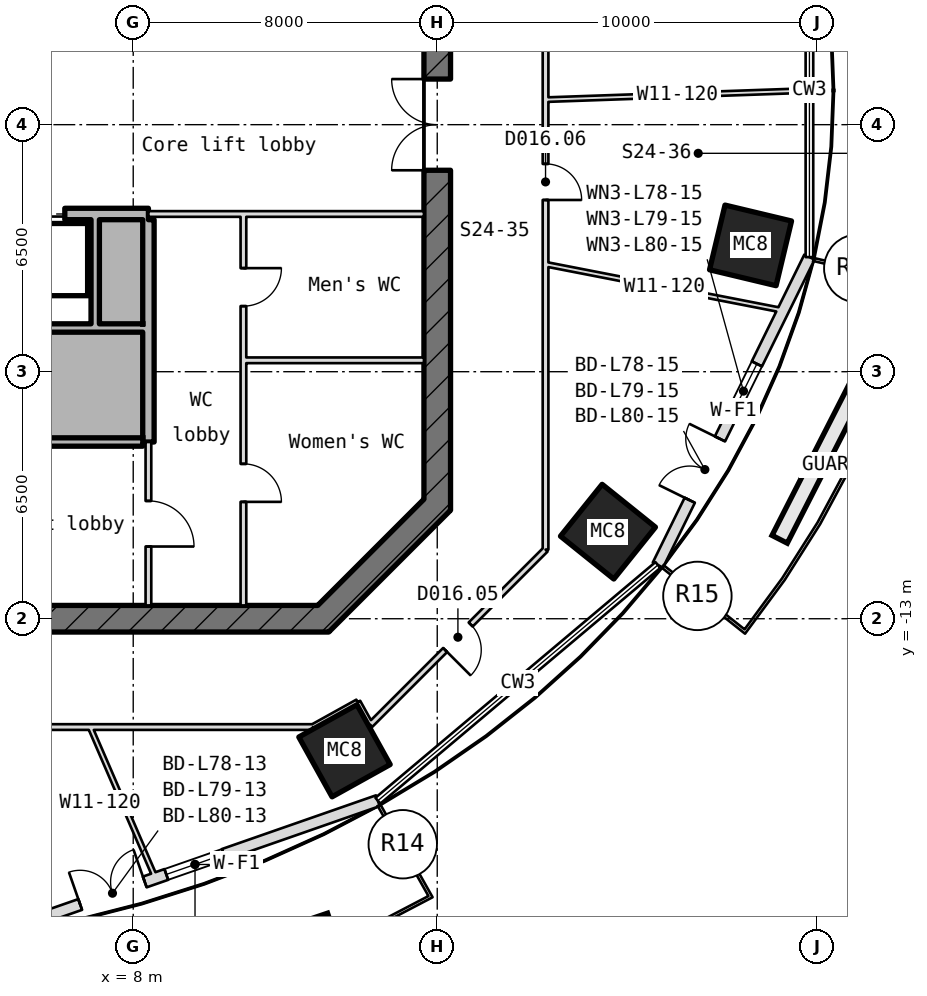
"""IFC4 building model, lengths in metres.
Left out: names, types, materials, properties, quantities, classifications, styles, units other than length and angle.
Written with IfcOpenShell. Run it as: python <this file> out.ifc"""

import sys

from ifc_helpers import new_model, si_unit, direction, frame, frame_2d, origin, origin_2d, place, context, subcontext, project, spatial, rectangle, hollow_rectangle, extrude, element, fill, save


model = new_model("IFC4")
c1 = context("Model", 3, precision=1e-05, world=origin(), true_north=direction((0.0, 1.0)))
c2 = subcontext(c1, "Body", "Model", "MODEL_VIEW")
j1 = project(units=[si_unit("LENGTHUNIT", "METRE"), si_unit("PLANEANGLEUNIT", "RADIAN")], contexts=[c1])
p1 = place(None, origin())
s1 = spatial("IfcSite", under=j1, at=p1, CompositionType="ELEMENT")
p2 = place(p1, origin())
s2 = spatial("IfcBuilding", under=s1, at=p2, CompositionType="ELEMENT")
p3 = place(p2, frame((0.0, 0.0, 346.75)))
s3 = spatial("IfcBuildingStorey", under=s2, at=p3, CompositionType="ELEMENT", Elevation=346.75)
for number, where, z_axis, x_axis in (
    (1, (13.56, -16.474, -0.18), (0.0, 0.0, 1.0), (-0.874, -0.486, 0.0)),
    (2, (20.492, -10.709, -0.18), (0.0, 0.0, 1.0), (-0.626, -0.78, 0.0)),
    (3, (24.244, -3.177, -0.18), (0.0, 0.0, 1.0), (-0.233, -0.973, 0.0)),
):
    element("IfcColumn", number, at=place(p3, frame(where, z_axis=z_axis, x_axis=x_axis)), inside=s3, PredefinedType="COLUMN", context=c2, shape_type="SweptSolid", body=[
        extrude(hollow_rectangle(XDim=1.75, YDim=1.8, WallThickness=0.055, at=origin_2d()), origin(), (0.0, 0.0, 1.0), 4.15),
    ])
p4 = place(p3, frame((4.81, -21.144, 0.0), z_axis=(0.0, 0.0, 1.0), x_axis=(0.944274972987, 0.329157675576, 0.0)))
e4 = element("IfcWall", 4, at=p4, inside=s3, PredefinedType="SOLIDWALL", context=c2, shape_type="SweptSolid", body=[
    extrude(rectangle(XDim=10.196, YDim=0.3, at=frame_2d((5.098, 0.0))), origin(), (0.0, 0.0, 1.0), 3.97),
])
p5 = place(p4, frame((1.9, 0.0, 0.0)))
e5 = element("IfcOpeningElement", 5, at=p5, cuts=e4, PredefinedType="OPENING", context=c2, shape_type="SweptSolid", body=[
    extrude(rectangle(XDim=1.8, YDim=2.4, at=frame_2d((0.9, 1.2))), frame((0.0, 0.16, 0.0), z_axis=(0.0, -1.0, 0.0), x_axis=(1.0, 0.0, 0.0)), (0.0, 0.0, 1.0), 0.32),
])
p6 = place(p4, frame((4.3, 0.0, 0.9)))
e6 = element("IfcOpeningElement", 6, at=p6, cuts=e4, PredefinedType="OPENING", context=c2, shape_type="SweptSolid", body=[
    extrude(rectangle(XDim=1.6, YDim=1.5, at=frame_2d((0.8, 0.75))), frame((0.0, 0.16, 0.0), z_axis=(0.0, -1.0, 0.0), x_axis=(1.0, 0.0, 0.0)), (0.0, 0.0, 1.0), 0.32),
])
p7 = place(p3, frame((21.806, -11.587, 0.0), z_axis=(0.0, 0.0, 1.0), x_axis=(0.441581239579, 0.897221270842, 0.0)))
e7 = element("IfcWall", 7, at=p7, inside=s3, PredefinedType="SOLIDWALL", context=c2, shape_type="SweptSolid", body=[
    extrude(rectangle(XDim=9.03, YDim=0.3, at=frame_2d((4.515, 0.0))), origin(), (0.0, 0.0, 1.0), 3.97),
])
p8 = place(p7, frame((1.9, 0.0, 0.0)))
e8 = element("IfcOpeningElement", 8, at=p8, cuts=e7, PredefinedType="OPENING", context=c2, shape_type="SweptSolid", body=[
    extrude(rectangle(XDim=1.8, YDim=2.4, at=frame_2d((0.9, 1.2))), frame((0.0, 0.16, 0.0), z_axis=(0.0, -1.0, 0.0), x_axis=(1.0, 0.0, 0.0)), (0.0, 0.0, 1.0), 0.32),
])
p9 = place(p7, frame((4.3, 0.0, 0.9)))
e9 = element("IfcOpeningElement", 9, at=p9, cuts=e7, PredefinedType="OPENING", context=c2, shape_type="SweptSolid", body=[
    extrude(rectangle(XDim=1.6, YDim=1.5, at=frame_2d((0.8, 0.75))), frame((0.0, 0.16, 0.0), z_axis=(0.0, -1.0, 0.0), x_axis=(1.0, 0.0, 0.0)), (0.0, 0.0, 1.0), 0.32),
])
p10 = place(p3, frame((12.897, -13.103, -0.18), z_axis=(0.0, 0.0, 1.0), x_axis=(0.707106781187, 0.707106781187, 0.0)))
e10 = element("IfcWall", 10, at=p10, inside=s3, PredefinedType="SHEAR", context=c2, shape_type="SweptSolid", body=[
    extrude(rectangle(XDim=4.533, YDim=0.7, at=frame_2d((2.266, 0.0))), origin(), (0.0, 0.0, 1.0), 4.15),
])
p11 = place(p3, frame((16.0, -10.145, -0.18), z_axis=(0.0, 0.0, 1.0), x_axis=(0.0, 1.0, 0.0)))
e11 = element("IfcWall", 11, at=p11, inside=s3, PredefinedType="SHEAR", context=c2, shape_type="SweptSolid", body=[
    extrude(rectangle(XDim=20.29, YDim=0.7, at=frame_2d((10.145, 0.0))), origin(), (0.0, 0.0, 1.0), 4.15),
])
p12 = place(p11, frame((8.945, 0.0, 0.18)))
e12 = element("IfcOpeningElement", 12, at=p12, cuts=e11, PredefinedType="OPENING", context=c2, shape_type="SweptSolid", body=[
    extrude(rectangle(XDim=2.4, YDim=2.1, at=frame_2d((1.2, 1.05))), frame((0.0, 0.36, 0.0), z_axis=(0.0, -1.0, 0.0), x_axis=(1.0, 0.0, 0.0)), (0.0, 0.0, 1.0), 0.72),
])
p13 = place(p11, frame((13.545, 0.0, 0.18)))
e13 = element("IfcOpeningElement", 13, at=p13, cuts=e11, PredefinedType="OPENING", context=c2, shape_type="SweptSolid", body=[
    extrude(rectangle(XDim=1.2, YDim=2.1, at=frame_2d((0.6, 1.05))), frame((0.0, 0.36, 0.0), z_axis=(0.0, -1.0, 0.0), x_axis=(1.0, 0.0, 0.0)), (0.0, 0.0, 1.0), 0.72),
])
p14 = place(p3, frame((-13.145, -13.0, -0.18), z_axis=(0.0, 0.0, 1.0), x_axis=(1.0, 0.0, 0.0)))
e14 = element("IfcWall", 14, at=p14, inside=s3, PredefinedType="SHEAR", context=c2, shape_type="SweptSolid", body=[
    extrude(rectangle(XDim=26.29, YDim=0.7, at=frame_2d((13.145, 0.0))), origin(), (0.0, 0.0, 1.0), 4.15),
])
p15 = place(p14, frame((2.845, 0.0, 0.18)))
e15 = element("IfcOpeningElement", 15, at=p15, cuts=e14, PredefinedType="OPENING", context=c2, shape_type="SweptSolid", body=[
    extrude(rectangle(XDim=1.2, YDim=2.1, at=frame_2d((0.6, 1.05))), frame((0.0, 0.36, 0.0), z_axis=(0.0, -1.0, 0.0), x_axis=(1.0, 0.0, 0.0)), (0.0, 0.0, 1.0), 0.72),
])
p16 = place(p14, frame((6.845, 0.0, 0.18)))
e16 = element("IfcOpeningElement", 16, at=p16, cuts=e14, PredefinedType="OPENING", context=c2, shape_type="SweptSolid", body=[
    extrude(rectangle(XDim=1.4, YDim=2.1, at=frame_2d((0.7, 1.05))), frame((0.0, 0.36, 0.0), z_axis=(0.0, -1.0, 0.0), x_axis=(1.0, 0.0, 0.0)), (0.0, 0.0, 1.0), 0.72),
])
p17 = place(p14, frame((15.445, 0.0, 0.18)))
e17 = element("IfcOpeningElement", 17, at=p17, cuts=e14, PredefinedType="OPENING", context=c2, shape_type="SweptSolid", body=[
    extrude(rectangle(XDim=1.4, YDim=2.1, at=frame_2d((0.7, 1.05))), frame((0.0, 0.36, 0.0), z_axis=(0.0, -1.0, 0.0), x_axis=(1.0, 0.0, 0.0)), (0.0, 0.0, 1.0), 0.72),
])
p18 = place(p3, frame((-2.69, -8.35, 0.0), z_axis=(0.0, 0.0, 1.0), x_axis=(1.0, 0.0, 0.0)))
e18 = element("IfcWall", 18, at=p18, inside=s3, PredefinedType="STANDARD", context=c2, shape_type="SweptSolid", body=[
    extrude(rectangle(XDim=10.94, YDim=0.22, at=frame_2d((5.47, 0.0))), origin(), (0.0, 0.0, 1.0), 3.97),
])
p19 = place(p18, frame((0.74, 0.0, 0.0)))
e19 = element("IfcOpeningElement", 19, at=p19, cuts=e18, PredefinedType="OPENING", context=c2, shape_type="SweptSolid", body=[
    extrude(rectangle(XDim=1.1, YDim=2.1, at=frame_2d((0.55, 1.05))), frame((0.0, 0.12, 0.0), z_axis=(0.0, -1.0, 0.0), x_axis=(1.0, 0.0, 0.0)), (0.0, 0.0, 1.0), 0.24),
])
p20 = place(p18, frame((3.54, 0.0, 0.0)))
e20 = element("IfcOpeningElement", 20, at=p20, cuts=e18, PredefinedType="OPENING", context=c2, shape_type="SweptSolid", body=[
    extrude(rectangle(XDim=1.1, YDim=2.1, at=frame_2d((0.55, 1.05))), frame((0.0, 0.12, 0.0), z_axis=(0.0, -1.0, 0.0), x_axis=(1.0, 0.0, 0.0)), (0.0, 0.0, 1.0), 0.24),
])
p21 = place(p3, frame((10.975, -6.2, 0.0), z_axis=(0.0, 0.0, 1.0), x_axis=(1.0, 0.0, 0.0)))
e21 = element("IfcWall", 21, at=p21, inside=s3, PredefinedType="PARTITIONING", context=c2, shape_type="SweptSolid", body=[
    extrude(rectangle(XDim=4.675, YDim=0.15, at=frame_2d((2.337, 0.0))), origin(), (0.0, 0.0, 1.0), 3.97),
])
p22 = place(p3, frame((-8.25, -5.35, 0.0), z_axis=(0.0, 0.0, 1.0), x_axis=(1.0, 0.0, 0.0)))
e22 = element("IfcWall", 22, at=p22, inside=s3, PredefinedType="STANDARD", context=c2, shape_type="SweptSolid", body=[
    extrude(rectangle(XDim=16.5, YDim=0.22, at=frame_2d((8.25, 0.0))), origin(), (0.0, 0.0, 1.0), 3.97),
])
p23 = place(p3, frame((-8.4, -2.35, -0.18), z_axis=(0.0, 0.0, 1.0), x_axis=(1.0, 0.0, 0.0)))
e23 = element("IfcWall", 23, at=p23, inside=s3, PredefinedType="SHEAR", context=c2, shape_type="SweptSolid", body=[
    extrude(rectangle(XDim=16.8, YDim=0.3, at=frame_2d((8.4, 0.0))), origin(), (0.0, 0.0, 1.0), 4.15),
])
p24 = place(p23, frame((2.2, 0.0, 0.18)))
e24 = element("IfcOpeningElement", 24, at=p24, cuts=e23, PredefinedType="OPENING", context=c2, shape_type="SweptSolid", body=[
    extrude(rectangle(XDim=1.2, YDim=2.1, at=frame_2d((0.6, 1.05))), frame((0.0, 0.16, 0.0), z_axis=(0.0, -1.0, 0.0), x_axis=(1.0, 0.0, 0.0)), (0.0, 0.0, 1.0), 0.32),
])
p25 = place(p23, frame((5.0, 0.0, 0.18)))
e25 = element("IfcOpeningElement", 25, at=p25, cuts=e23, PredefinedType="OPENING", context=c2, shape_type="SweptSolid", body=[
    extrude(rectangle(XDim=1.2, YDim=2.1, at=frame_2d((0.6, 1.05))), frame((0.0, 0.16, 0.0), z_axis=(0.0, -1.0, 0.0), x_axis=(1.0, 0.0, 0.0)), (0.0, 0.0, 1.0), 0.32),
])
p26 = place(p23, frame((7.8, 0.0, 0.18)))
e26 = element("IfcOpeningElement", 26, at=p26, cuts=e23, PredefinedType="OPENING", context=c2, shape_type="SweptSolid", body=[
    extrude(rectangle(XDim=1.2, YDim=2.1, at=frame_2d((0.6, 1.05))), frame((0.0, 0.16, 0.0), z_axis=(0.0, -1.0, 0.0), x_axis=(1.0, 0.0, 0.0)), (0.0, 0.0, 1.0), 0.32),
])
p27 = place(p23, frame((10.6, 0.0, 0.18)))
e27 = element("IfcOpeningElement", 27, at=p27, cuts=e23, PredefinedType="OPENING", context=c2, shape_type="SweptSolid", body=[
    extrude(rectangle(XDim=1.2, YDim=2.1, at=frame_2d((0.6, 1.05))), frame((0.0, 0.16, 0.0), z_axis=(0.0, -1.0, 0.0), x_axis=(1.0, 0.0, 0.0)), (0.0, 0.0, 1.0), 0.32),
])
p28 = place(p23, frame((13.4, 0.0, 0.18)))
e28 = element("IfcOpeningElement", 28, at=p28, cuts=e23, PredefinedType="OPENING", context=c2, shape_type="SweptSolid", body=[
    extrude(rectangle(XDim=1.2, YDim=2.1, at=frame_2d((0.6, 1.05))), frame((0.0, 0.16, 0.0), z_axis=(0.0, -1.0, 0.0), x_axis=(1.0, 0.0, 0.0)), (0.0, 0.0, 1.0), 0.32),
])
p29 = place(p3, frame((8.4, -2.35, 0.0), z_axis=(0.0, 0.0, 1.0), x_axis=(1.0, 0.0, 0.0)))
e29 = element("IfcWall", 29, at=p29, inside=s3, PredefinedType="PARTITIONING", context=c2, shape_type="SweptSolid", body=[
    extrude(rectangle(XDim=7.25, YDim=0.15, at=frame_2d((3.625, 0.0))), origin(), (0.0, 0.0, 1.0), 3.97),
])
p30 = place(p3, frame((7.0, -5.24, 0.0), z_axis=(0.0, 0.0, 1.0), x_axis=(0.0, 1.0, 0.0)))
e30 = element("IfcWall", 30, at=p30, inside=s3, PredefinedType="STANDARD", context=c2, shape_type="SweptSolid", body=[
    extrude(rectangle(XDim=2.74, YDim=0.22, at=frame_2d((1.37, 0.0))), origin(), (0.0, 0.0, 1.0), 3.97),
])
p31 = place(p3, frame((8.4, -12.65, 0.0), z_axis=(0.0, 0.0, 1.0), x_axis=(0.0, 1.0, 0.0)))
e31 = element("IfcWall", 31, at=p31, inside=s3, PredefinedType="PARTITIONING", context=c2, shape_type="SweptSolid", body=[
    extrude(rectangle(XDim=4.3, YDim=0.15, at=frame_2d((2.15, 0.0))), origin(), (0.0, 0.0, 1.0), 3.97),
])
p32 = place(p31, frame((1.55, 0.0, 0.0)))
e32 = element("IfcOpeningElement", 32, at=p32, cuts=e31, PredefinedType="OPENING", context=c2, shape_type="SweptSolid", body=[
    extrude(rectangle(XDim=1.2, YDim=2.1, at=frame_2d((0.6, 1.05))), frame((0.0, 0.085, 0.0), z_axis=(0.0, -1.0, 0.0), x_axis=(1.0, 0.0, 0.0)), (0.0, 0.0, 1.0), 0.17),
])
p33 = place(p3, frame((8.4, -8.35, -0.18), z_axis=(0.0, 0.0, 1.0), x_axis=(0.0, 1.0, 0.0)))
e33 = element("IfcWall", 33, at=p33, inside=s3, PredefinedType="SHEAR", context=c2, shape_type="SweptSolid", body=[
    extrude(rectangle(XDim=5.85, YDim=0.3, at=frame_2d((2.925, 0.0))), origin(), (0.0, 0.0, 1.0), 4.15),
])
p34 = place(p3, frame((10.9, -12.65, 0.0), z_axis=(0.0, 0.0, 1.0), x_axis=(0.0, 1.0, 0.0)))
e34 = element("IfcWall", 34, at=p34, inside=s3, PredefinedType="PARTITIONING", context=c2, shape_type="SweptSolid", body=[
    extrude(rectangle(XDim=10.225, YDim=0.15, at=frame_2d((5.112, 0.0))), origin(), (0.0, 0.0, 1.0), 3.97),
])
p35 = place(p34, frame((7.875, 0.0, 0.0)))
e35 = element("IfcOpeningElement", 35, at=p35, cuts=e34, PredefinedType="OPENING", context=c2, shape_type="SweptSolid", body=[
    extrude(rectangle(XDim=1.0, YDim=2.1, at=frame_2d((0.5, 1.05))), frame((0.0, 0.085, 0.0), z_axis=(0.0, -1.0, 0.0), x_axis=(1.0, 0.0, 0.0)), (0.0, 0.0, 1.0), 0.17),
])
p36 = place(p34, frame((2.725, 0.0, 0.0)))
e36 = element("IfcOpeningElement", 36, at=p36, cuts=e34, PredefinedType="OPENING", context=c2, shape_type="SweptSolid", body=[
    extrude(rectangle(XDim=1.0, YDim=2.1, at=frame_2d((0.5, 1.05))), frame((0.0, 0.085, 0.0), z_axis=(0.0, -1.0, 0.0), x_axis=(1.0, 0.0, 0.0)), (0.0, 0.0, 1.0), 0.17),
])
p37 = place(p3, frame((6.865, -15.85, 0.0), z_axis=(0.0, 0.0, 1.0), x_axis=(0.397444614723, -0.917626164747, 0.0)))
e37 = element("IfcWall", 37, at=p37, inside=s3, PredefinedType="PARTITIONING", context=c2, shape_type="SweptSolid", body=[
    extrude(rectangle(XDim=4.334, YDim=0.12, at=frame_2d((2.167, 0.0))), origin(), (0.0, 0.0, 1.0), 3.97),
])
p38 = place(p3, frame((12.728, -15.85, 0.0), z_axis=(0.0, 0.0, 1.0), x_axis=(-1.0, 0.0, 0.0)))
e38 = element("IfcWall", 38, at=p38, inside=s3, PredefinedType="PARTITIONING", context=c2, shape_type="SweptSolid", body=[
    extrude(rectangle(XDim=26.255, YDim=0.15, at=frame_2d((13.127, 0.0))), origin(), (0.0, 0.0, 1.0), 3.97),
])
p39 = place(p38, frame((18.742, 0.0, 0.0)))
e39 = element("IfcOpeningElement", 39, at=p39, cuts=e38, PredefinedType="OPENING", context=c2, shape_type="SweptSolid", body=[
    extrude(rectangle(XDim=1.8, YDim=2.1, at=frame_2d((0.9, 1.05))), frame((0.0, 0.085, 0.0), z_axis=(0.0, -1.0, 0.0), x_axis=(1.0, 0.0, 0.0)), (0.0, 0.0, 1.0), 0.17),
])
p40 = place(p3, frame((13.907, -15.195, 0.0), z_axis=(0.0, 0.0, 1.0), x_axis=(-0.874071918373, -0.485796543331, 0.0)))
e40 = element("IfcWall", 40, at=p40, inside=s3, PredefinedType="PARTITIONING", context=c2, shape_type="SweptSolid", body=[
    extrude(rectangle(XDim=1.349, YDim=0.15, at=frame_2d((0.675, 0.0))), origin(), (0.0, 0.0, 1.0), 3.97),
])
p41 = place(p3, frame((14.239, -15.792, 0.0), z_axis=(0.0, 0.0, 1.0), x_axis=(-0.485673274087, 0.874140418261, 0.0)))
e41 = element("IfcWall", 41, at=p41, inside=s3, PredefinedType="PARTITIONING", context=c2, shape_type="SweptSolid", body=[
    extrude(rectangle(XDim=0.683, YDim=0.15, at=frame_2d((0.342, 0.0))), origin(), (0.0, 0.0, 1.0), 3.97),
])
p42 = place(p3, frame((18.85, -11.18, 0.0), z_axis=(0.0, 0.0, 1.0), x_axis=(-0.707130380125, -0.707083181461, 0.0)))
e42 = element("IfcWall", 42, at=p42, inside=s3, PredefinedType="PARTITIONING", context=c2, shape_type="SweptSolid", body=[
    extrude(rectangle(XDim=5.173, YDim=0.15, at=frame_2d((2.586, 0.0))), origin(), (0.0, 0.0, 1.0), 3.97),
])
p43 = place(p42, frame((2.786, 0.0, 0.0)))
e43 = element("IfcOpeningElement", 43, at=p43, cuts=e42, PredefinedType="OPENING", context=c2, shape_type="SweptSolid", body=[
    extrude(rectangle(XDim=0.95, YDim=2.1, at=frame_2d((0.475, 1.05))), frame((0.0, 0.085, 0.0), z_axis=(0.0, -1.0, 0.0), x_axis=(1.0, 0.0, 0.0)), (0.0, 0.0, 1.0), 0.17),
])
p44 = place(p3, frame((15.192, -14.838, 0.0), z_axis=(0.0, 0.0, 1.0), x_axis=(-0.70701627152, -0.70719727927, 0.0)))
e44 = element("IfcWall", 44, at=p44, inside=s3, PredefinedType="PARTITIONING", context=c2, shape_type="SweptSolid", body=[
    extrude(rectangle(XDim=1.349, YDim=0.15, at=frame_2d((0.674, 0.0))), origin(), (0.0, 0.0, 1.0), 3.508),
])
p45 = place(p3, frame((18.85, -3.671, 0.0), z_axis=(0.0, 0.0, 1.0), x_axis=(0.981557300208, -0.191168162643, 0.0)))
e45 = element("IfcWall", 45, at=p45, inside=s3, PredefinedType="PARTITIONING", context=c2, shape_type="SweptSolid", body=[
    extrude(rectangle(XDim=6.37, YDim=0.12, at=frame_2d((3.185, 0.0))), origin(), (0.0, 0.0, 1.0), 3.97),
])
p46 = place(p3, frame((18.85, 0.658, 0.0), z_axis=(0.0, 0.0, 1.0), x_axis=(0.999392274324, 0.034858026656, 0.0)))
e46 = element("IfcWall", 46, at=p46, inside=s3, PredefinedType="PARTITIONING", context=c2, shape_type="SweptSolid", body=[
    extrude(rectangle(XDim=6.948, YDim=0.12, at=frame_2d((3.474, 0.0))), origin(), (0.0, 0.0, 1.0), 3.97),
])
p47 = place(p3, frame((18.85, 11.18, 0.0), z_axis=(0.0, 0.0, 1.0), x_axis=(0.0, -1.0, 0.0)))
e47 = element("IfcWall", 47, at=p47, inside=s3, PredefinedType="PARTITIONING", context=c2, shape_type="SweptSolid", body=[
    extrude(rectangle(XDim=22.361, YDim=0.15, at=frame_2d((11.18, 0.0))), origin(), (0.0, 0.0, 1.0), 3.97),
])
p48 = place(p47, frame((6.896, 0.0, 0.0)))
e48 = element("IfcOpeningElement", 48, at=p48, cuts=e47, PredefinedType="OPENING", context=c2, shape_type="SweptSolid", body=[
    extrude(rectangle(XDim=0.95, YDim=2.1, at=frame_2d((0.475, 1.05))), frame((0.0, 0.085, 0.0), z_axis=(0.0, -1.0, 0.0), x_axis=(1.0, 0.0, 0.0)), (0.0, 0.0, 1.0), 0.17),
])
p49 = place(p47, frame((2.205, 0.0, 0.0)))
e49 = element("IfcOpeningElement", 49, at=p49, cuts=e47, PredefinedType="OPENING", context=c2, shape_type="SweptSolid", body=[
    extrude(rectangle(XDim=0.95, YDim=2.1, at=frame_2d((0.475, 1.05))), frame((0.0, 0.085, 0.0), z_axis=(0.0, -1.0, 0.0), x_axis=(1.0, 0.0, 0.0)), (0.0, 0.0, 1.0), 0.17),
])
p50 = place(p47, frame((12.212, 0.0, 0.0)))
e50 = element("IfcOpeningElement", 50, at=p50, cuts=e47, PredefinedType="OPENING", context=c2, shape_type="SweptSolid", body=[
    extrude(rectangle(XDim=0.95, YDim=2.1, at=frame_2d((0.475, 1.05))), frame((0.0, 0.085, 0.0), z_axis=(0.0, -1.0, 0.0), x_axis=(1.0, 0.0, 0.0)), (0.0, 0.0, 1.0), 0.17),
])
p51 = place(p5, origin())
e51 = element("IfcDoor", 51, at=p51, inside=s3, OperationType="SINGLE_SWING_LEFT", PredefinedType="DOOR", context=c2, shape_type="SweptSolid", body=[
    extrude(rectangle(XDim=1.8, YDim=2.4, at=frame_2d((0.9, 1.2))), frame((0.0, 0.025, 0.0), z_axis=(0.0, -1.0, 0.0), x_axis=(1.0, 0.0, 0.0)), (0.0, 0.0, 1.0), 0.05),
])
fill(e5, e51)
p52 = place(p6, origin())
e52 = element("IfcWindow", 52, at=p52, inside=s3, PartitioningType="SINGLE_PANEL", PredefinedType="WINDOW", context=c2, shape_type="SweptSolid", body=[
    extrude(rectangle(XDim=1.6, YDim=1.5, at=frame_2d((0.8, 0.75))), frame((0.0, 0.03, 0.0), z_axis=(0.0, -1.0, 0.0), x_axis=(1.0, 0.0, 0.0)), (0.0, 0.0, 1.0), 0.06),
])
fill(e6, e52)
p53 = place(p8, origin())
e53 = element("IfcDoor", 53, at=p53, inside=s3, OperationType="SINGLE_SWING_LEFT", PredefinedType="DOOR", context=c2, shape_type="SweptSolid", body=[
    extrude(rectangle(XDim=1.8, YDim=2.4, at=frame_2d((0.9, 1.2))), frame((0.0, 0.025, 0.0), z_axis=(0.0, -1.0, 0.0), x_axis=(1.0, 0.0, 0.0)), (0.0, 0.0, 1.0), 0.05),
])
fill(e8, e53)
p54 = place(p9, origin())
e54 = element("IfcWindow", 54, at=p54, inside=s3, PartitioningType="SINGLE_PANEL", PredefinedType="WINDOW", context=c2, shape_type="SweptSolid", body=[
    extrude(rectangle(XDim=1.6, YDim=1.5, at=frame_2d((0.8, 0.75))), frame((0.0, 0.03, 0.0), z_axis=(0.0, -1.0, 0.0), x_axis=(1.0, 0.0, 0.0)), (0.0, 0.0, 1.0), 0.06),
])
fill(e9, e54)
p55 = place(p28, origin())
e55 = element("IfcDoor", 55, at=p55, inside=s3, OperationType="DOUBLE_DOOR_SLIDING", PredefinedType="DOOR", context=c2, shape_type="SweptSolid", body=[
    extrude(rectangle(XDim=1.2, YDim=2.1, at=frame_2d((0.6, 1.05))), frame((0.0, 0.025, 0.0), z_axis=(0.0, -1.0, 0.0), x_axis=(1.0, 0.0, 0.0)), (0.0, 0.0, 1.0), 0.05),
])
fill(e28, e55)
p56 = place(p12, origin())
e56 = element("IfcDoor", 56, at=p56, inside=s3, OperationType="DOUBLE_DOOR_SINGLE_SWING", PredefinedType="DOOR", context=c2, shape_type="SweptSolid", body=[
    extrude(rectangle(XDim=2.4, YDim=2.1, at=frame_2d((1.2, 1.05))), frame((0.0, 0.025, 0.0), z_axis=(0.0, -1.0, 0.0), x_axis=(1.0, 0.0, 0.0)), (0.0, 0.0, 1.0), 0.05),
])
fill(e12, e56)
p57 = place(p32, frame((1.2, 0.0, 0.0), z_axis=(0.0, 0.0, 1.0), x_axis=(-1.0, 0.0, 0.0)))
e57 = element("IfcDoor", 57, at=p57, inside=s3, OperationType="SINGLE_SWING_LEFT", PredefinedType="DOOR", context=c2, shape_type="SweptSolid", body=[
    extrude(rectangle(XDim=1.2, YDim=2.1, at=frame_2d((0.6, 1.05))), frame((0.0, 0.025, 0.0), z_axis=(0.0, -1.0, 0.0), x_axis=(1.0, 0.0, 0.0)), (0.0, 0.0, 1.0), 0.05),
])
fill(e32, e57)
p58 = place(p35, frame((1.0, 0.0, 0.0), z_axis=(0.0, 0.0, 1.0), x_axis=(-1.0, 0.0, 0.0)))
e58 = element("IfcDoor", 58, at=p58, inside=s3, OperationType="SINGLE_SWING_LEFT", PredefinedType="DOOR", context=c2, shape_type="SweptSolid", body=[
    extrude(rectangle(XDim=1.0, YDim=2.1, at=frame_2d((0.5, 1.05))), frame((0.0, 0.025, 0.0), z_axis=(0.0, -1.0, 0.0), x_axis=(1.0, 0.0, 0.0)), (0.0, 0.0, 1.0), 0.05),
])
fill(e35, e58)
p59 = place(p36, frame((1.0, 0.0, 0.0), z_axis=(0.0, 0.0, 1.0), x_axis=(-1.0, 0.0, 0.0)))
e59 = element("IfcDoor", 59, at=p59, inside=s3, OperationType="SINGLE_SWING_LEFT", PredefinedType="DOOR", context=c2, shape_type="SweptSolid", body=[
    extrude(rectangle(XDim=1.0, YDim=2.1, at=frame_2d((0.5, 1.05))), frame((0.0, 0.025, 0.0), z_axis=(0.0, -1.0, 0.0), x_axis=(1.0, 0.0, 0.0)), (0.0, 0.0, 1.0), 0.05),
])
fill(e36, e59)
p60 = place(p43, origin())
e60 = element("IfcDoor", 60, at=p60, inside=s3, OperationType="SINGLE_SWING_RIGHT", PredefinedType="DOOR", context=c2, shape_type="SweptSolid", body=[
    extrude(rectangle(XDim=0.95, YDim=2.1, at=frame_2d((0.475, 1.05))), frame((0.0, 0.025, 0.0), z_axis=(0.0, -1.0, 0.0), x_axis=(1.0, 0.0, 0.0)), (0.0, 0.0, 1.0), 0.05),
])
fill(e43, e60)
p61 = place(p50, origin())
e61 = element("IfcDoor", 61, at=p61, inside=s3, OperationType="SINGLE_SWING_RIGHT", PredefinedType="DOOR", context=c2, shape_type="SweptSolid", body=[
    extrude(rectangle(XDim=0.95, YDim=2.1, at=frame_2d((0.475, 1.05))), frame((0.0, 0.025, 0.0), z_axis=(0.0, -1.0, 0.0), x_axis=(1.0, 0.0, 0.0)), (0.0, 0.0, 1.0), 0.05),
])
fill(e50, e61)
save(model, sys.argv[1])
